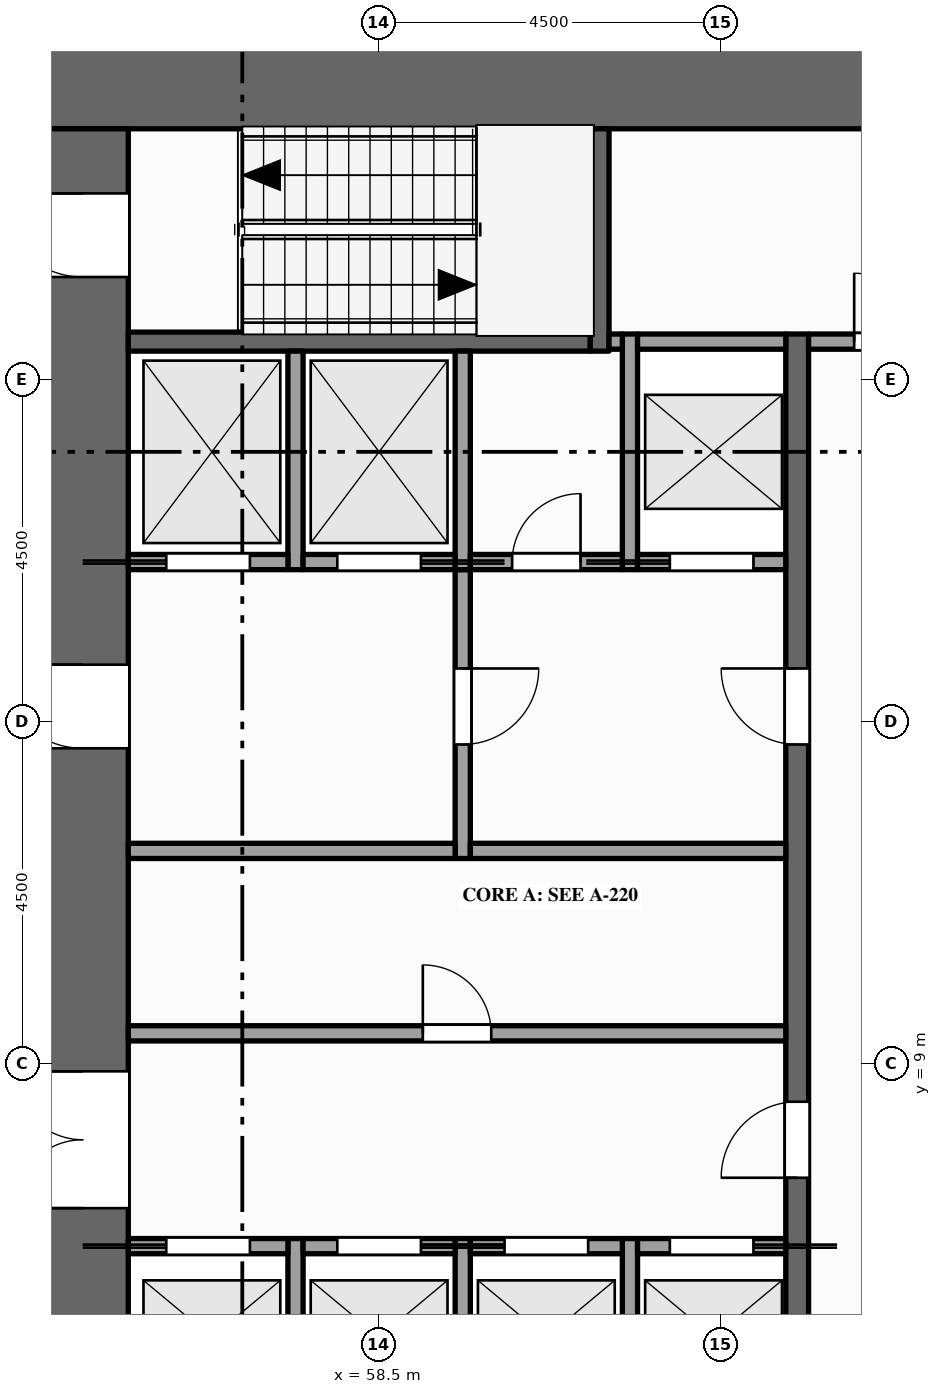
"""IFC4 building model, lengths in metres.
Left out: names, types, materials, properties, quantities, classifications, styles, units other than length and angle.
Written with IfcOpenShell. Run it as: python <this file> out.ifc"""

import sys

from ifc_helpers import new_model, si_unit, direction, frame, frame_2d, origin, place, context, subcontext, project, spatial, rectangle, extrude, element, fill, save


model = new_model("IFC4")
c1 = context("Model", 3, precision=1e-05, world=origin(), true_north=direction((0.0, 1.0)))
c2 = subcontext(c1, "Body", "Model", "MODEL_VIEW")
j1 = project(units=[si_unit("LENGTHUNIT", "METRE"), si_unit("PLANEANGLEUNIT", "RADIAN")], contexts=[c1])
p1 = place(None, origin())
s1 = spatial("IfcSite", under=j1, at=p1, CompositionType="ELEMENT")
p2 = place(p1, origin())
s2 = spatial("IfcBuilding", under=s1, at=p2, CompositionType="ELEMENT")
p3 = place(p2, frame((0.0, 0.0, 115.0)))
s3 = spatial("IfcBuildingStorey", under=s2, at=p3, CompositionType="ELEMENT", Elevation=115.0)
p4 = place(p3, frame((54.0, 21.9, -0.15), z_axis=(0.0, 0.0, 1.0), x_axis=(1.0, 0.0, 0.0)))
e1 = element("IfcWall", 1, at=p4, inside=s3, PredefinedType="SHEAR", context=c2, shape_type="SweptSolid", body=[
    extrude(rectangle(XDim=13.5, YDim=1.2, at=frame_2d((6.75, 0.0))), origin(), (0.0, 0.0, 1.0), 4.0),
])
p5 = place(p3, frame((54.6, 1.2, -0.15), z_axis=(0.0, 0.0, 1.0), x_axis=(0.0, 1.0, 0.0)))
e2 = element("IfcWall", 2, at=p5, inside=s3, PredefinedType="SHEAR", context=c2, shape_type="SweptSolid", body=[
    extrude(rectangle(XDim=20.1, YDim=1.2, at=frame_2d((10.05, 0.0))), origin(), (0.0, 0.0, 1.0), 4.0),
])
p6 = place(p5, frame((5.9, 0.0, 0.15)))
e3 = element("IfcOpeningElement", 3, at=p6, cuts=e2, PredefinedType="OPENING", context=c2, shape_type="SweptSolid", body=[
    extrude(rectangle(XDim=1.8, YDim=2.1, at=frame_2d((0.9, 1.05))), frame((0.0, 0.61, 0.0), z_axis=(0.0, -1.0, 0.0), x_axis=(1.0, 0.0, 0.0)), (0.0, 0.0, 1.0), 1.22),
])
p7 = place(p5, frame((11.95, 0.0, 0.15)))
e4 = element("IfcOpeningElement", 4, at=p7, cuts=e2, PredefinedType="OPENING", context=c2, shape_type="SweptSolid", body=[
    extrude(rectangle(XDim=1.1, YDim=2.1, at=frame_2d((0.55, 1.05))), frame((0.0, 0.61, 0.0), z_axis=(0.0, -1.0, 0.0), x_axis=(1.0, 0.0, 0.0)), (0.0, 0.0, 1.0), 1.22),
])
p8 = place(p5, frame((0.95, 0.0, 0.15)))
e5 = element("IfcOpeningElement", 5, at=p8, cuts=e2, PredefinedType="OPENING", context=c2, shape_type="SweptSolid", body=[
    extrude(rectangle(XDim=1.1, YDim=2.1, at=frame_2d((0.55, 1.05))), frame((0.0, 0.61, 0.0), z_axis=(0.0, -1.0, 0.0), x_axis=(1.0, 0.0, 0.0)), (0.0, 0.0, 1.0), 1.22),
])
p9 = place(p5, frame((18.15, 0.0, 0.15)))
e6 = element("IfcOpeningElement", 6, at=p9, cuts=e2, PredefinedType="OPENING", context=c2, shape_type="SweptSolid", body=[
    extrude(rectangle(XDim=1.1, YDim=2.1, at=frame_2d((0.55, 1.05))), frame((0.0, 0.61, 0.0), z_axis=(0.0, -1.0, 0.0), x_axis=(1.0, 0.0, 0.0)), (0.0, 0.0, 1.0), 1.22),
])
p10 = place(p3, frame((57.4, 4.325, 0.0), z_axis=(0.0, 0.0, 1.0), x_axis=(0.0, 1.0, 0.0)))
e7 = element("IfcWall", 7, at=p10, inside=s3, PredefinedType="SOLIDWALL", context=c2, shape_type="SweptSolid", body=[
    extrude(rectangle(XDim=2.375, YDim=0.2, at=frame_2d((1.188, 0.0))), origin(), (0.0, 0.0, 1.0), 3.85),
])
p11 = place(p3, frame((57.4, 15.5, 0.0), z_axis=(0.0, 0.0, 1.0), x_axis=(0.0, 1.0, 0.0)))
e8 = element("IfcWall", 8, at=p11, inside=s3, PredefinedType="SOLIDWALL", context=c2, shape_type="SweptSolid", body=[
    extrude(rectangle(XDim=2.875, YDim=0.2, at=frame_2d((1.438, 0.0))), origin(), (0.0, 0.0, 1.0), 3.85),
])
p12 = place(p3, frame((59.6, 4.325, 0.0), z_axis=(0.0, 0.0, 1.0), x_axis=(0.0, 1.0, 0.0)))
e9 = element("IfcWall", 9, at=p12, inside=s3, PredefinedType="SOLIDWALL", context=c2, shape_type="SweptSolid", body=[
    extrude(rectangle(XDim=2.375, YDim=0.2, at=frame_2d((1.188, 0.0))), origin(), (0.0, 0.0, 1.0), 3.85),
])
p13 = place(p3, frame((59.6, 11.7, 0.0), z_axis=(0.0, 0.0, 1.0), x_axis=(0.0, 1.0, 0.0)))
e10 = element("IfcWall", 10, at=p13, inside=s3, PredefinedType="PARTITIONING", context=c2, shape_type="SweptSolid", body=[
    extrude(rectangle(XDim=3.8, YDim=0.2, at=frame_2d((1.9, 0.0))), origin(), (0.0, 0.0, 1.0), 3.85),
])
p14 = place(p13, frame((1.5, 0.0, 0.0)))
e11 = element("IfcOpeningElement", 11, at=p14, cuts=e10, PredefinedType="OPENING", context=c2, shape_type="SweptSolid", body=[
    extrude(rectangle(XDim=1.0, YDim=2.1, at=frame_2d((0.5, 1.05))), frame((0.0, 0.11, 0.0), z_axis=(0.0, -1.0, 0.0), x_axis=(1.0, 0.0, 0.0)), (0.0, 0.0, 1.0), 0.22),
])
p15 = place(p3, frame((59.6, 15.5, 0.0), z_axis=(0.0, 0.0, 1.0), x_axis=(0.0, 1.0, 0.0)))
e12 = element("IfcWall", 12, at=p15, inside=s3, PredefinedType="SOLIDWALL", context=c2, shape_type="SweptSolid", body=[
    extrude(rectangle(XDim=2.875, YDim=0.2, at=frame_2d((1.438, 0.0))), origin(), (0.0, 0.0, 1.0), 3.85),
])
p16 = place(p3, frame((61.4, 18.375, 0.0), z_axis=(0.0, 0.0, 1.0), x_axis=(0.0, 1.0, 0.0)))
e13 = element("IfcWall", 13, at=p16, inside=s3, PredefinedType="SHEAR", context=c2, shape_type="SweptSolid", body=[
    extrude(rectangle(XDim=2.925, YDim=0.25, at=frame_2d((1.462, 0.0))), origin(), (0.0, 0.0, 1.0), 3.85),
])
p17 = place(p3, frame((61.8, 4.1, 0.0), z_axis=(0.0, 0.0, 1.0), x_axis=(0.0, 1.0, 0.0)))
e14 = element("IfcWall", 14, at=p17, inside=s3, PredefinedType="SOLIDWALL", context=c2, shape_type="SweptSolid", body=[
    extrude(rectangle(XDim=2.6, YDim=0.2, at=frame_2d((1.3, 0.0))), origin(), (0.0, 0.0, 1.0), 3.85),
])
p18 = place(p3, frame((61.8, 15.5, 0.0), z_axis=(0.0, 0.0, 1.0), x_axis=(0.0, 1.0, 0.0)))
e15 = element("IfcWall", 15, at=p18, inside=s3, PredefinedType="SOLIDWALL", context=c2, shape_type="SweptSolid", body=[
    extrude(rectangle(XDim=3.1, YDim=0.2, at=frame_2d((1.55, 0.0))), origin(), (0.0, 0.0, 1.0), 3.85),
])
p19 = place(p3, frame((64.0, 4.1, 0.0), z_axis=(0.0, 0.0, 1.0), x_axis=(0.0, 1.0, 0.0)))
e16 = element("IfcWall", 16, at=p19, inside=s3, PredefinedType="SHEAR", context=c2, shape_type="SweptSolid", body=[
    extrude(rectangle(XDim=14.5, YDim=0.3, at=frame_2d((7.25, 0.0))), origin(), (0.0, 0.0, 1.0), 3.85),
])
p20 = place(p19, frame((3.4, 0.0, 0.0)))
e17 = element("IfcOpeningElement", 17, at=p20, cuts=e16, PredefinedType="OPENING", context=c2, shape_type="SweptSolid", body=[
    extrude(rectangle(XDim=1.0, YDim=2.1, at=frame_2d((0.5, 1.05))), frame((0.0, 0.16, 0.0), z_axis=(0.0, -1.0, 0.0), x_axis=(1.0, 0.0, 0.0)), (0.0, 0.0, 1.0), 0.32),
])
p21 = place(p19, frame((9.1, 0.0, 0.0)))
e18 = element("IfcOpeningElement", 18, at=p21, cuts=e16, PredefinedType="OPENING", context=c2, shape_type="SweptSolid", body=[
    extrude(rectangle(XDim=1.0, YDim=2.1, at=frame_2d((0.5, 1.05))), frame((0.0, 0.16, 0.0), z_axis=(0.0, -1.0, 0.0), x_axis=(1.0, 0.0, 0.0)), (0.0, 0.0, 1.0), 0.32),
])
p22 = place(p3, frame((55.2, 6.6, 0.0), z_axis=(0.0, 0.0, 1.0), x_axis=(1.0, 0.0, 0.0)))
e19 = element("IfcWall", 19, at=p22, inside=s3, PredefinedType="SOLIDWALL", context=c2, shape_type="SweptSolid", body=[
    extrude(rectangle(XDim=2.1, YDim=0.2, at=frame_2d((1.05, 0.0))), origin(), (0.0, 0.0, 1.0), 3.85),
])
p23 = place(p22, frame((0.5, 0.0, 0.012)))
e20 = element("IfcOpeningElement", 20, at=p23, cuts=e19, PredefinedType="OPENING", context=c2, shape_type="SweptSolid", body=[
    extrude(rectangle(XDim=1.1, YDim=2.1, at=frame_2d((0.55, 1.05))), frame((0.0, 0.11, 0.0), z_axis=(0.0, -1.0, 0.0), x_axis=(1.0, 0.0, 0.0)), (0.0, 0.0, 1.0), 0.22),
])
p24 = place(p3, frame((57.5, 6.6, 0.0), z_axis=(0.0, 0.0, 1.0), x_axis=(1.0, 0.0, 0.0)))
e21 = element("IfcWall", 21, at=p24, inside=s3, PredefinedType="SOLIDWALL", context=c2, shape_type="SweptSolid", body=[
    extrude(rectangle(XDim=2.0, YDim=0.2, at=frame_2d((1.0, 0.0))), origin(), (0.0, 0.0, 1.0), 3.85),
])
p25 = place(p24, frame((0.45, 0.0, 0.012)))
e22 = element("IfcOpeningElement", 22, at=p25, cuts=e21, PredefinedType="OPENING", context=c2, shape_type="SweptSolid", body=[
    extrude(rectangle(XDim=1.1, YDim=2.1, at=frame_2d((0.55, 1.05))), frame((0.0, 0.11, 0.0), z_axis=(0.0, -1.0, 0.0), x_axis=(1.0, 0.0, 0.0)), (0.0, 0.0, 1.0), 0.22),
])
p26 = place(p3, frame((59.7, 6.6, 0.0), z_axis=(0.0, 0.0, 1.0), x_axis=(1.0, 0.0, 0.0)))
e23 = element("IfcWall", 23, at=p26, inside=s3, PredefinedType="SOLIDWALL", context=c2, shape_type="SweptSolid", body=[
    extrude(rectangle(XDim=2.0, YDim=0.2, at=frame_2d((1.0, 0.0))), origin(), (0.0, 0.0, 1.0), 3.85),
])
p27 = place(p26, frame((0.45, 0.0, 0.012)))
e24 = element("IfcOpeningElement", 24, at=p27, cuts=e23, PredefinedType="OPENING", context=c2, shape_type="SweptSolid", body=[
    extrude(rectangle(XDim=1.1, YDim=2.1, at=frame_2d((0.55, 1.05))), frame((0.0, 0.11, 0.0), z_axis=(0.0, -1.0, 0.0), x_axis=(1.0, 0.0, 0.0)), (0.0, 0.0, 1.0), 0.22),
])
p28 = place(p3, frame((61.9, 6.6, 0.0), z_axis=(0.0, 0.0, 1.0), x_axis=(1.0, 0.0, 0.0)))
e25 = element("IfcWall", 25, at=p28, inside=s3, PredefinedType="SOLIDWALL", context=c2, shape_type="SweptSolid", body=[
    extrude(rectangle(XDim=1.95, YDim=0.2, at=frame_2d((0.975, 0.0))), origin(), (0.0, 0.0, 1.0), 3.85),
])
p29 = place(p28, frame((0.425, 0.0, 0.012)))
e26 = element("IfcOpeningElement", 26, at=p29, cuts=e25, PredefinedType="OPENING", context=c2, shape_type="SweptSolid", body=[
    extrude(rectangle(XDim=1.1, YDim=2.1, at=frame_2d((0.55, 1.05))), frame((0.0, 0.11, 0.0), z_axis=(0.0, -1.0, 0.0), x_axis=(1.0, 0.0, 0.0)), (0.0, 0.0, 1.0), 0.22),
])
p30 = place(p3, frame((55.2, 9.4, 0.0), z_axis=(0.0, 0.0, 1.0), x_axis=(1.0, 0.0, 0.0)))
e27 = element("IfcWall", 27, at=p30, inside=s3, PredefinedType="PARTITIONING", context=c2, shape_type="SweptSolid", body=[
    extrude(rectangle(XDim=8.65, YDim=0.2, at=frame_2d((4.325, 0.0))), origin(), (0.0, 0.0, 1.0), 3.85),
])
p31 = place(p30, frame((3.875, 0.0, 0.0)))
e28 = element("IfcOpeningElement", 28, at=p31, cuts=e27, PredefinedType="OPENING", context=c2, shape_type="SweptSolid", body=[
    extrude(rectangle(XDim=0.9, YDim=2.1, at=frame_2d((0.45, 1.05))), frame((0.0, 0.11, 0.0), z_axis=(0.0, -1.0, 0.0), x_axis=(1.0, 0.0, 0.0)), (0.0, 0.0, 1.0), 0.22),
])
p32 = place(p3, frame((55.2, 11.8, 0.0), z_axis=(0.0, 0.0, 1.0), x_axis=(1.0, 0.0, 0.0)))
e29 = element("IfcWall", 29, at=p32, inside=s3, PredefinedType="PARTITIONING", context=c2, shape_type="SweptSolid", body=[
    extrude(rectangle(XDim=4.3, YDim=0.2, at=frame_2d((2.15, 0.0))), origin(), (0.0, 0.0, 1.0), 3.85),
])
p33 = place(p3, frame((59.7, 11.8, 0.0), z_axis=(0.0, 0.0, 1.0), x_axis=(1.0, 0.0, 0.0)))
e30 = element("IfcWall", 30, at=p33, inside=s3, PredefinedType="PARTITIONING", context=c2, shape_type="SweptSolid", body=[
    extrude(rectangle(XDim=4.15, YDim=0.2, at=frame_2d((2.075, 0.0))), origin(), (0.0, 0.0, 1.0), 3.85),
])
p34 = place(p3, frame((55.2, 15.6, 0.0), z_axis=(0.0, 0.0, 1.0), x_axis=(1.0, 0.0, 0.0)))
e31 = element("IfcWall", 31, at=p34, inside=s3, PredefinedType="SOLIDWALL", context=c2, shape_type="SweptSolid", body=[
    extrude(rectangle(XDim=2.1, YDim=0.2, at=frame_2d((1.05, 0.0))), origin(), (0.0, 0.0, 1.0), 3.85),
])
p35 = place(p34, frame((0.5, 0.0, 0.012)))
e32 = element("IfcOpeningElement", 32, at=p35, cuts=e31, PredefinedType="OPENING", context=c2, shape_type="SweptSolid", body=[
    extrude(rectangle(XDim=1.1, YDim=2.1, at=frame_2d((0.55, 1.05))), frame((0.0, 0.11, 0.0), z_axis=(0.0, -1.0, 0.0), x_axis=(1.0, 0.0, 0.0)), (0.0, 0.0, 1.0), 0.22),
])
p36 = place(p3, frame((57.5, 15.6, 0.0), z_axis=(0.0, 0.0, 1.0), x_axis=(1.0, 0.0, 0.0)))
e33 = element("IfcWall", 33, at=p36, inside=s3, PredefinedType="SOLIDWALL", context=c2, shape_type="SweptSolid", body=[
    extrude(rectangle(XDim=2.0, YDim=0.2, at=frame_2d((1.0, 0.0))), origin(), (0.0, 0.0, 1.0), 3.85),
])
p37 = place(p36, frame((0.45, 0.0, 0.012)))
e34 = element("IfcOpeningElement", 34, at=p37, cuts=e33, PredefinedType="OPENING", context=c2, shape_type="SweptSolid", body=[
    extrude(rectangle(XDim=1.1, YDim=2.1, at=frame_2d((0.55, 1.05))), frame((0.0, 0.11, 0.0), z_axis=(0.0, -1.0, 0.0), x_axis=(1.0, 0.0, 0.0)), (0.0, 0.0, 1.0), 0.22),
])
p38 = place(p3, frame((59.7, 15.6, 0.0), z_axis=(0.0, 0.0, 1.0), x_axis=(1.0, 0.0, 0.0)))
e35 = element("IfcWall", 35, at=p38, inside=s3, PredefinedType="PARTITIONING", context=c2, shape_type="SweptSolid", body=[
    extrude(rectangle(XDim=2.0, YDim=0.2, at=frame_2d((1.0, 0.0))), origin(), (0.0, 0.0, 1.0), 3.85),
])
p39 = place(p38, frame((0.55, 0.0, 0.0)))
e36 = element("IfcOpeningElement", 36, at=p39, cuts=e35, PredefinedType="OPENING", context=c2, shape_type="SweptSolid", body=[
    extrude(rectangle(XDim=0.9, YDim=2.1, at=frame_2d((0.45, 1.05))), frame((0.0, 0.11, 0.0), z_axis=(0.0, -1.0, 0.0), x_axis=(1.0, 0.0, 0.0)), (0.0, 0.0, 1.0), 0.22),
])
p40 = place(p3, frame((61.9, 15.6, 0.0), z_axis=(0.0, 0.0, 1.0), x_axis=(1.0, 0.0, 0.0)))
e37 = element("IfcWall", 37, at=p40, inside=s3, PredefinedType="SOLIDWALL", context=c2, shape_type="SweptSolid", body=[
    extrude(rectangle(XDim=1.95, YDim=0.2, at=frame_2d((0.975, 0.0))), origin(), (0.0, 0.0, 1.0), 3.85),
])
p41 = place(p40, frame((0.425, 0.0, 0.012)))
e38 = element("IfcOpeningElement", 38, at=p41, cuts=e37, PredefinedType="OPENING", context=c2, shape_type="SweptSolid", body=[
    extrude(rectangle(XDim=1.1, YDim=2.1, at=frame_2d((0.55, 1.05))), frame((0.0, 0.11, 0.0), z_axis=(0.0, -1.0, 0.0), x_axis=(1.0, 0.0, 0.0)), (0.0, 0.0, 1.0), 0.22),
])
p42 = place(p3, frame((55.2, 18.5, 0.0), z_axis=(0.0, 0.0, 1.0), x_axis=(1.0, 0.0, 0.0)))
e39 = element("IfcWall", 39, at=p42, inside=s3, PredefinedType="SHEAR", context=c2, shape_type="SweptSolid", body=[
    extrude(rectangle(XDim=6.075, YDim=0.25, at=frame_2d((3.038, 0.0))), origin(), (0.0, 0.0, 1.0), 3.85),
])
p43 = place(p3, frame((61.525, 18.5, 0.0), z_axis=(0.0, 0.0, 1.0), x_axis=(1.0, 0.0, 0.0)))
e40 = element("IfcWall", 40, at=p43, inside=s3, PredefinedType="PARTITIONING", context=c2, shape_type="SweptSolid", body=[
    extrude(rectangle(XDim=0.175, YDim=0.2, at=frame_2d((0.087, 0.0))), origin(), (0.0, 0.0, 1.0), 3.85),
])
p44 = place(p3, frame((61.9, 18.5, 0.0), z_axis=(0.0, 0.0, 1.0), x_axis=(1.0, 0.0, 0.0)))
e41 = element("IfcWall", 41, at=p44, inside=s3, PredefinedType="SOLIDWALL", context=c2, shape_type="SweptSolid", body=[
    extrude(rectangle(XDim=1.95, YDim=0.2, at=frame_2d((0.975, 0.0))), origin(), (0.0, 0.0, 1.0), 3.85),
])
p45 = place(p3, frame((64.15, 18.5, 0.0), z_axis=(0.0, 0.0, 1.0), x_axis=(1.0, 0.0, 0.0)))
e42 = element("IfcWall", 42, at=p45, inside=s3, PredefinedType="PARTITIONING", context=c2, shape_type="SweptSolid", body=[
    extrude(rectangle(XDim=2.15, YDim=0.2, at=frame_2d((1.075, 0.0))), origin(), (0.0, 0.0, 1.0), 3.85),
])
p46 = place(p45, frame((0.6, 0.0, 0.0)))
e43 = element("IfcOpeningElement", 43, at=p46, cuts=e42, PredefinedType="OPENING", context=c2, shape_type="SweptSolid", body=[
    extrude(rectangle(XDim=0.9, YDim=2.1, at=frame_2d((0.45, 1.05))), frame((0.0, 0.11, 0.0), z_axis=(0.0, -1.0, 0.0), x_axis=(1.0, 0.0, 0.0)), (0.0, 0.0, 1.0), 0.22),
])
p47 = place(p23, origin())
e44 = element("IfcDoor", 44, at=p47, inside=s3, OperationType="SLIDING_TO_LEFT", PredefinedType="DOOR", context=c2, shape_type="SweptSolid", body=[
    extrude(rectangle(XDim=1.1, YDim=2.1, at=frame_2d((0.55, 1.05))), frame((0.0, 0.025, 0.0), z_axis=(0.0, -1.0, 0.0), x_axis=(1.0, 0.0, 0.0)), (0.0, 0.0, 1.0), 0.05),
])
fill(e20, e44)
p48 = place(p25, origin())
e45 = element("IfcDoor", 45, at=p48, inside=s3, OperationType="SLIDING_TO_RIGHT", PredefinedType="DOOR", context=c2, shape_type="SweptSolid", body=[
    extrude(rectangle(XDim=1.1, YDim=2.1, at=frame_2d((0.55, 1.05))), frame((0.0, 0.025, 0.0), z_axis=(0.0, -1.0, 0.0), x_axis=(1.0, 0.0, 0.0)), (0.0, 0.0, 1.0), 0.05),
])
fill(e22, e45)
p49 = place(p27, origin())
e46 = element("IfcDoor", 46, at=p49, inside=s3, OperationType="SLIDING_TO_LEFT", PredefinedType="DOOR", context=c2, shape_type="SweptSolid", body=[
    extrude(rectangle(XDim=1.1, YDim=2.1, at=frame_2d((0.55, 1.05))), frame((0.0, 0.025, 0.0), z_axis=(0.0, -1.0, 0.0), x_axis=(1.0, 0.0, 0.0)), (0.0, 0.0, 1.0), 0.05),
])
fill(e24, e46)
p50 = place(p29, origin())
e47 = element("IfcDoor", 47, at=p50, inside=s3, OperationType="SLIDING_TO_RIGHT", PredefinedType="DOOR", context=c2, shape_type="SweptSolid", body=[
    extrude(rectangle(XDim=1.1, YDim=2.1, at=frame_2d((0.55, 1.05))), frame((0.0, 0.025, 0.0), z_axis=(0.0, -1.0, 0.0), x_axis=(1.0, 0.0, 0.0)), (0.0, 0.0, 1.0), 0.05),
])
fill(e26, e47)
p51 = place(p35, origin())
e48 = element("IfcDoor", 48, at=p51, inside=s3, OperationType="SLIDING_TO_LEFT", PredefinedType="DOOR", context=c2, shape_type="SweptSolid", body=[
    extrude(rectangle(XDim=1.1, YDim=2.1, at=frame_2d((0.55, 1.05))), frame((0.0, 0.025, 0.0), z_axis=(0.0, -1.0, 0.0), x_axis=(1.0, 0.0, 0.0)), (0.0, 0.0, 1.0), 0.05),
])
fill(e32, e48)
p52 = place(p37, origin())
e49 = element("IfcDoor", 49, at=p52, inside=s3, OperationType="SLIDING_TO_RIGHT", PredefinedType="DOOR", context=c2, shape_type="SweptSolid", body=[
    extrude(rectangle(XDim=1.1, YDim=2.1, at=frame_2d((0.55, 1.05))), frame((0.0, 0.025, 0.0), z_axis=(0.0, -1.0, 0.0), x_axis=(1.0, 0.0, 0.0)), (0.0, 0.0, 1.0), 0.05),
])
fill(e34, e49)
p53 = place(p41, origin())
e50 = element("IfcDoor", 50, at=p53, inside=s3, OperationType="SLIDING_TO_LEFT", PredefinedType="DOOR", context=c2, shape_type="SweptSolid", body=[
    extrude(rectangle(XDim=1.1, YDim=2.1, at=frame_2d((0.55, 1.05))), frame((0.0, 0.025, 0.0), z_axis=(0.0, -1.0, 0.0), x_axis=(1.0, 0.0, 0.0)), (0.0, 0.0, 1.0), 0.05),
])
fill(e38, e50)
p54 = place(p6, origin())
e51 = element("IfcDoor", 51, at=p54, inside=s3, OperationType="DOUBLE_DOOR_SINGLE_SWING", PredefinedType="DOOR", context=c2, shape_type="SweptSolid", body=[
    extrude(rectangle(XDim=1.8, YDim=2.1, at=frame_2d((0.9, 1.05))), frame((0.0, 0.025, 0.0), z_axis=(0.0, -1.0, 0.0), x_axis=(1.0, 0.0, 0.0)), (0.0, 0.0, 1.0), 0.05),
])
fill(e3, e51)
p55 = place(p20, origin())
e52 = element("IfcDoor", 52, at=p55, inside=s3, OperationType="SINGLE_SWING_LEFT", PredefinedType="DOOR", context=c2, shape_type="SweptSolid", body=[
    extrude(rectangle(XDim=1.0, YDim=2.1, at=frame_2d((0.5, 1.05))), frame((0.0, 0.025, 0.0), z_axis=(0.0, -1.0, 0.0), x_axis=(1.0, 0.0, 0.0)), (0.0, 0.0, 1.0), 0.05),
])
fill(e17, e52)
p56 = place(p7, origin())
e53 = element("IfcDoor", 53, at=p56, inside=s3, OperationType="SINGLE_SWING_RIGHT", PredefinedType="DOOR", context=c2, shape_type="SweptSolid", body=[
    extrude(rectangle(XDim=1.1, YDim=2.1, at=frame_2d((0.55, 1.05))), frame((0.0, 0.025, 0.0), z_axis=(0.0, -1.0, 0.0), x_axis=(1.0, 0.0, 0.0)), (0.0, 0.0, 1.0), 0.05),
])
fill(e4, e53)
p57 = place(p14, origin())
e54 = element("IfcDoor", 54, at=p57, inside=s3, OperationType="SINGLE_SWING_RIGHT", PredefinedType="DOOR", context=c2, shape_type="SweptSolid", body=[
    extrude(rectangle(XDim=1.0, YDim=2.1, at=frame_2d((0.5, 1.05))), frame((0.0, 0.025, 0.0), z_axis=(0.0, -1.0, 0.0), x_axis=(1.0, 0.0, 0.0)), (0.0, 0.0, 1.0), 0.05),
])
fill(e11, e54)
p58 = place(p21, origin())
e55 = element("IfcDoor", 55, at=p58, inside=s3, OperationType="SINGLE_SWING_RIGHT", PredefinedType="DOOR", context=c2, shape_type="SweptSolid", body=[
    extrude(rectangle(XDim=1.0, YDim=2.1, at=frame_2d((0.5, 1.05))), frame((0.0, 0.025, 0.0), z_axis=(0.0, -1.0, 0.0), x_axis=(1.0, 0.0, 0.0)), (0.0, 0.0, 1.0), 0.05),
])
fill(e18, e55)
p59 = place(p9, origin())
e56 = element("IfcDoor", 56, at=p59, inside=s3, OperationType="SINGLE_SWING_RIGHT", PredefinedType="DOOR", context=c2, shape_type="SweptSolid", body=[
    extrude(rectangle(XDim=1.1, YDim=2.1, at=frame_2d((0.55, 1.05))), frame((0.0, 0.025, 0.0), z_axis=(0.0, -1.0, 0.0), x_axis=(1.0, 0.0, 0.0)), (0.0, 0.0, 1.0), 0.05),
])
fill(e6, e56)
p60 = place(p46, origin())
e57 = element("IfcDoor", 57, at=p60, inside=s3, OperationType="SINGLE_SWING_LEFT", PredefinedType="DOOR", context=c2, shape_type="SweptSolid", body=[
    extrude(rectangle(XDim=0.9, YDim=2.1, at=frame_2d((0.45, 1.05))), frame((0.0, 0.025, 0.0), z_axis=(0.0, -1.0, 0.0), x_axis=(1.0, 0.0, 0.0)), (0.0, 0.0, 1.0), 0.05),
])
fill(e43, e57)
p61 = place(p31, origin())
e58 = element("IfcDoor", 58, at=p61, inside=s3, OperationType="SINGLE_SWING_LEFT", PredefinedType="DOOR", context=c2, shape_type="SweptSolid", body=[
    extrude(rectangle(XDim=0.9, YDim=2.1, at=frame_2d((0.45, 1.05))), frame((0.0, 0.025, 0.0), z_axis=(0.0, -1.0, 0.0), x_axis=(1.0, 0.0, 0.0)), (0.0, 0.0, 1.0), 0.05),
])
fill(e28, e58)
p62 = place(p39, origin())
e59 = element("IfcDoor", 59, at=p62, inside=s3, OperationType="SINGLE_SWING_RIGHT", PredefinedType="DOOR", context=c2, shape_type="SweptSolid", body=[
    extrude(rectangle(XDim=0.9, YDim=2.1, at=frame_2d((0.45, 1.05))), frame((0.0, 0.025, 0.0), z_axis=(0.0, -1.0, 0.0), x_axis=(1.0, 0.0, 0.0)), (0.0, 0.0, 1.0), 0.05),
])
fill(e36, e59)
save(model, sys.argv[1])
